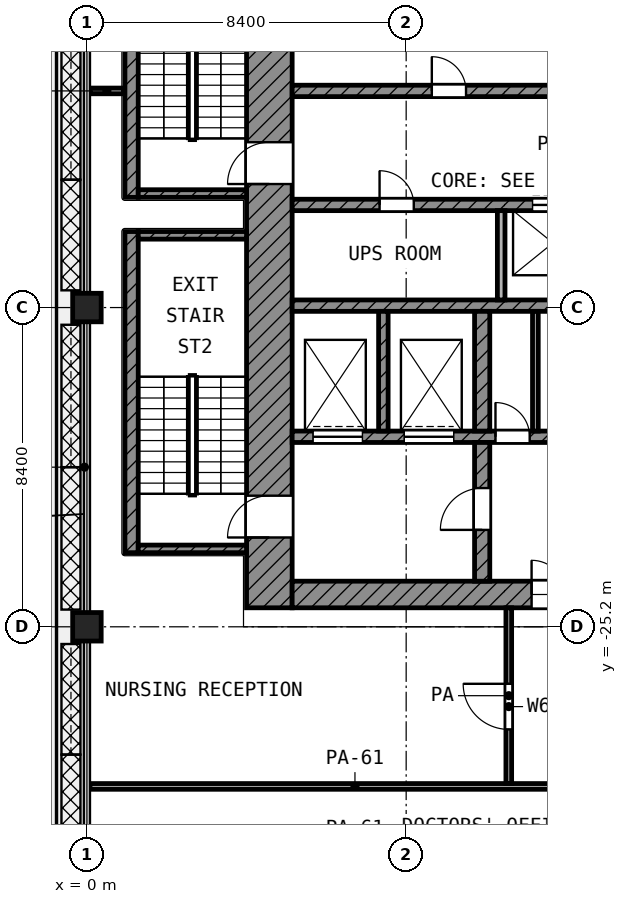
"""IFC4 building model, lengths in metres.
Left out: names, types, materials, properties, quantities, classifications, styles, units other than length and angle.
Written with IfcOpenShell. Run it as: python <this file> out.ifc"""

import sys

from ifc_helpers import new_model, si_unit, direction, frame, frame_2d, origin, origin_2d, place, context, subcontext, project, spatial, rectangle, extrude, element, fill, save


model = new_model("IFC4")
c1 = context("Model", 3, precision=1e-05, world=origin(), true_north=direction((0.0, 1.0)))
c2 = subcontext(c1, "Body", "Model", "MODEL_VIEW")
j1 = project(units=[si_unit("LENGTHUNIT", "METRE"), si_unit("PLANEANGLEUNIT", "RADIAN")], contexts=[c1])
p1 = place(None, origin())
s1 = spatial("IfcSite", under=j1, at=p1, CompositionType="ELEMENT")
p2 = place(p1, origin())
s2 = spatial("IfcBuilding", under=s1, at=p2, CompositionType="ELEMENT")
p3 = place(p2, frame((0.0, 0.0, 319.6)))
s3 = spatial("IfcBuildingStorey", under=s2, at=p3, CompositionType="ELEMENT", Elevation=319.6)
for number, where, z_axis, x_axis in (
    (1, (0.0, -16.8, 0.0), (0.0, 0.0, 1.0), (1.0, 0.0, 0.0)),
    (2, (0.0, -25.2, 0.0), (0.0, 0.0, 1.0), (1.0, 0.0, 0.0)),
):
    element("IfcColumn", number, at=place(p3, frame(where, z_axis=z_axis, x_axis=x_axis)), inside=s3, PredefinedType="COLUMN", context=c2, shape_type="SweptSolid", body=[
        extrude(rectangle(XDim=0.75, YDim=0.75, at=origin_2d()), origin(), (0.0, 0.0, 1.0), 4.2),
    ])
p4 = place(p3, frame((4.8, -24.7, 0.0), z_axis=(0.0, 0.0, 1.0), x_axis=(0.0, 1.0, 0.0)))
e3 = element("IfcWall", 3, at=p4, inside=s3, PredefinedType="SHEAR", context=c2, shape_type="SweptSolid", body=[
    extrude(rectangle(XDim=19.3, YDim=1.2, at=frame_2d((9.65, 0.0))), origin(), (0.0, 0.0, 1.0), 3.6),
])
p5 = place(p4, frame((11.15, 0.0, 0.0)))
e4 = element("IfcOpeningElement", 4, at=p5, cuts=e3, PredefinedType="OPENING", context=c2, shape_type="SweptSolid", body=[
    extrude(rectangle(XDim=1.1, YDim=2.1, at=frame_2d((0.55, 1.05))), frame((0.0, 0.61, 0.0), z_axis=(0.0, -1.0, 0.0), x_axis=(1.0, 0.0, 0.0)), (0.0, 0.0, 1.0), 1.22),
])
p6 = place(p4, frame((1.85, 0.0, 0.0)))
e5 = element("IfcOpeningElement", 5, at=p6, cuts=e3, PredefinedType="OPENING", context=c2, shape_type="SweptSolid", body=[
    extrude(rectangle(XDim=1.1, YDim=2.1, at=frame_2d((0.55, 1.05))), frame((0.0, 0.61, 0.0), z_axis=(0.0, -1.0, 0.0), x_axis=(1.0, 0.0, 0.0)), (0.0, 0.0, 1.0), 1.22),
])
p7 = place(p3, frame((5.4, -24.35, 0.0), z_axis=(0.0, 0.0, 1.0), x_axis=(1.0, 0.0, 0.0)))
e6 = element("IfcWall", 6, at=p7, inside=s3, PredefinedType="SHEAR", context=c2, shape_type="SweptSolid", body=[
    extrude(rectangle(XDim=18.6, YDim=0.7, at=frame_2d((9.3, 0.0))), origin(), (0.0, 0.0, 1.0), 3.6),
])
p8 = place(p7, frame((6.3, 0.0, 0.0)))
e7 = element("IfcOpeningElement", 7, at=p8, cuts=e6, PredefinedType="OPENING", context=c2, shape_type="SweptSolid", body=[
    extrude(rectangle(XDim=1.8, YDim=2.1, at=frame_2d((0.9, 1.05))), frame((0.0, 0.36, 0.0), z_axis=(0.0, -1.0, 0.0), x_axis=(1.0, 0.0, 0.0)), (0.0, 0.0, 1.0), 0.72),
])
p9 = place(p3, frame((5.4, -11.1, 0.0), z_axis=(0.0, 0.0, 1.0), x_axis=(1.0, 0.0, 0.0)))
e8 = element("IfcWall", 8, at=p9, inside=s3, PredefinedType="SHEAR", context=c2, shape_type="SweptSolid", body=[
    extrude(rectangle(XDim=16.65, YDim=0.3, at=frame_2d((8.325, 0.0))), origin(), (0.0, 0.0, 1.0), 3.6),
])
p10 = place(p9, frame((3.675, 0.0, 0.0)))
e9 = element("IfcOpeningElement", 9, at=p10, cuts=e8, PredefinedType="OPENING", context=c2, shape_type="SweptSolid", body=[
    extrude(rectangle(XDim=0.9, YDim=2.1, at=frame_2d((0.45, 1.05))), frame((0.0, 0.16, 0.0), z_axis=(0.0, -1.0, 0.0), x_axis=(1.0, 0.0, 0.0)), (0.0, 0.0, 1.0), 0.32),
])
p11 = place(p9, frame((11.925, 0.0, 0.0)))
e10 = element("IfcOpeningElement", 10, at=p11, cuts=e8, PredefinedType="OPENING", context=c2, shape_type="SweptSolid", body=[
    extrude(rectangle(XDim=0.9, YDim=2.1, at=frame_2d((0.45, 1.05))), frame((0.0, 0.16, 0.0), z_axis=(0.0, -1.0, 0.0), x_axis=(1.0, 0.0, 0.0)), (0.0, 0.0, 1.0), 0.32),
])
p12 = place(p3, frame((5.4, -14.1, 0.0), z_axis=(0.0, 0.0, 1.0), x_axis=(1.0, 0.0, 0.0)))
e11 = element("IfcWall", 11, at=p12, inside=s3, PredefinedType="SHEAR", context=c2, shape_type="SweptSolid", body=[
    extrude(rectangle(XDim=16.65, YDim=0.3, at=frame_2d((8.325, 0.0))), origin(), (0.0, 0.0, 1.0), 3.6),
])
p13 = place(p12, frame((6.325, 0.0, 0.0)))
e12 = element("IfcOpeningElement", 12, at=p13, cuts=e11, PredefinedType="OPENING", context=c2, shape_type="SweptSolid", body=[
    extrude(rectangle(XDim=1.1, YDim=2.1, at=frame_2d((0.55, 1.05))), frame((0.0, 0.16, 0.0), z_axis=(0.0, -1.0, 0.0), x_axis=(1.0, 0.0, 0.0)), (0.0, 0.0, 1.0), 0.32),
])
p14 = place(p12, frame((9.075, 0.0, 0.0)))
e13 = element("IfcOpeningElement", 13, at=p14, cuts=e11, PredefinedType="OPENING", context=c2, shape_type="SweptSolid", body=[
    extrude(rectangle(XDim=1.1, YDim=2.1, at=frame_2d((0.55, 1.05))), frame((0.0, 0.16, 0.0), z_axis=(0.0, -1.0, 0.0), x_axis=(1.0, 0.0, 0.0)), (0.0, 0.0, 1.0), 0.32),
])
p15 = place(p12, frame((11.825, 0.0, 0.0)))
e14 = element("IfcOpeningElement", 14, at=p15, cuts=e11, PredefinedType="OPENING", context=c2, shape_type="SweptSolid", body=[
    extrude(rectangle(XDim=1.1, YDim=2.1, at=frame_2d((0.55, 1.05))), frame((0.0, 0.16, 0.0), z_axis=(0.0, -1.0, 0.0), x_axis=(1.0, 0.0, 0.0)), (0.0, 0.0, 1.0), 0.32),
])
p16 = place(p12, frame((14.575, 0.0, 0.0)))
e15 = element("IfcOpeningElement", 15, at=p16, cuts=e11, PredefinedType="OPENING", context=c2, shape_type="SweptSolid", body=[
    extrude(rectangle(XDim=1.1, YDim=2.1, at=frame_2d((0.55, 1.05))), frame((0.0, 0.16, 0.0), z_axis=(0.0, -1.0, 0.0), x_axis=(1.0, 0.0, 0.0)), (0.0, 0.0, 1.0), 0.32),
])
p17 = place(p12, frame((2.3, 0.0, 0.0)))
e16 = element("IfcOpeningElement", 16, at=p17, cuts=e11, PredefinedType="OPENING", context=c2, shape_type="SweptSolid", body=[
    extrude(rectangle(XDim=0.9, YDim=2.1, at=frame_2d((0.45, 1.05))), frame((0.0, 0.16, 0.0), z_axis=(0.0, -1.0, 0.0), x_axis=(1.0, 0.0, 0.0)), (0.0, 0.0, 1.0), 0.32),
])
p18 = place(p3, frame((5.4, -16.75, 0.0), z_axis=(0.0, 0.0, 1.0), x_axis=(1.0, 0.0, 0.0)))
e17 = element("IfcWall", 17, at=p18, inside=s3, PredefinedType="SHEAR", context=c2, shape_type="SweptSolid", body=[
    extrude(rectangle(XDim=16.65, YDim=0.3, at=frame_2d((8.325, 0.0))), origin(), (0.0, 0.0, 1.0), 3.6),
])
p19 = place(p3, frame((5.4, -20.2, 0.0), z_axis=(0.0, 0.0, 1.0), x_axis=(1.0, 0.0, 0.0)))
e18 = element("IfcWall", 18, at=p19, inside=s3, PredefinedType="SHEAR", context=c2, shape_type="SweptSolid", body=[
    extrude(rectangle(XDim=14.65, YDim=0.3, at=frame_2d((7.325, 0.0))), origin(), (0.0, 0.0, 1.0), 3.6),
])
p20 = place(p19, frame((10.55, 0.0, 0.0)))
e19 = element("IfcOpeningElement", 19, at=p20, cuts=e18, PredefinedType="OPENING", context=c2, shape_type="SweptSolid", body=[
    extrude(rectangle(XDim=1.3, YDim=2.1, at=frame_2d((0.65, 1.05))), frame((0.0, 0.16, 0.0), z_axis=(0.0, -1.0, 0.0), x_axis=(1.0, 0.0, 0.0)), (0.0, 0.0, 1.0), 0.32),
])
p21 = place(p19, frame((12.95, 0.0, 0.0)))
e20 = element("IfcOpeningElement", 20, at=p21, cuts=e18, PredefinedType="OPENING", context=c2, shape_type="SweptSolid", body=[
    extrude(rectangle(XDim=1.3, YDim=2.1, at=frame_2d((0.65, 1.05))), frame((0.0, 0.16, 0.0), z_axis=(0.0, -1.0, 0.0), x_axis=(1.0, 0.0, 0.0)), (0.0, 0.0, 1.0), 0.32),
])
p22 = place(p19, frame((0.55, 0.0, 0.0)))
e21 = element("IfcOpeningElement", 21, at=p22, cuts=e18, PredefinedType="OPENING", context=c2, shape_type="SweptSolid", body=[
    extrude(rectangle(XDim=1.3, YDim=2.1, at=frame_2d((0.65, 1.05))), frame((0.0, 0.16, 0.0), z_axis=(0.0, -1.0, 0.0), x_axis=(1.0, 0.0, 0.0)), (0.0, 0.0, 1.0), 0.32),
])
p23 = place(p19, frame((2.95, 0.0, 0.0)))
e22 = element("IfcOpeningElement", 22, at=p23, cuts=e18, PredefinedType="OPENING", context=c2, shape_type="SweptSolid", body=[
    extrude(rectangle(XDim=1.3, YDim=2.1, at=frame_2d((0.65, 1.05))), frame((0.0, 0.16, 0.0), z_axis=(0.0, -1.0, 0.0), x_axis=(1.0, 0.0, 0.0)), (0.0, 0.0, 1.0), 0.32),
])
p24 = place(p19, frame((5.35, 0.0, 0.0)))
e23 = element("IfcOpeningElement", 23, at=p24, cuts=e18, PredefinedType="OPENING", context=c2, shape_type="SweptSolid", body=[
    extrude(rectangle(XDim=0.9, YDim=2.1, at=frame_2d((0.45, 1.05))), frame((0.0, 0.16, 0.0), z_axis=(0.0, -1.0, 0.0), x_axis=(1.0, 0.0, 0.0)), (0.0, 0.0, 1.0), 0.32),
])
p25 = place(p19, frame((7.75, 0.0, 0.0)))
e24 = element("IfcOpeningElement", 24, at=p25, cuts=e18, PredefinedType="OPENING", context=c2, shape_type="SweptSolid", body=[
    extrude(rectangle(XDim=0.9, YDim=2.1, at=frame_2d((0.45, 1.05))), frame((0.0, 0.16, 0.0), z_axis=(0.0, -1.0, 0.0), x_axis=(1.0, 0.0, 0.0)), (0.0, 0.0, 1.0), 0.32),
])
p26 = place(p3, frame((10.4, -24.0, 0.0), z_axis=(0.0, 0.0, 1.0), x_axis=(0.0, 1.0, 0.0)))
e25 = element("IfcWall", 25, at=p26, inside=s3, PredefinedType="SHEAR", context=c2, shape_type="SweptSolid", body=[
    extrude(rectangle(XDim=3.65, YDim=0.4, at=frame_2d((1.825, 0.0))), origin(), (0.0, 0.0, 1.0), 3.6),
])
p27 = place(p26, frame((1.35, 0.0, 0.0)))
e26 = element("IfcOpeningElement", 26, at=p27, cuts=e25, PredefinedType="OPENING", context=c2, shape_type="SweptSolid", body=[
    extrude(rectangle(XDim=1.1, YDim=2.1, at=frame_2d((0.55, 1.05))), frame((0.0, 0.21, 0.0), z_axis=(0.0, -1.0, 0.0), x_axis=(1.0, 0.0, 0.0)), (0.0, 0.0, 1.0), 0.42),
])
p28 = place(p3, frame((10.4, -20.05, 0.0), z_axis=(0.0, 0.0, 1.0), x_axis=(0.0, 1.0, 0.0)))
e27 = element("IfcWall", 27, at=p28, inside=s3, PredefinedType="SHEAR", context=c2, shape_type="SweptSolid", body=[
    extrude(rectangle(XDim=3.15, YDim=0.4, at=frame_2d((1.575, 0.0))), origin(), (0.0, 0.0, 1.0), 3.6),
])
p29 = place(p3, frame((7.8, -20.05, 0.0), z_axis=(0.0, 0.0, 1.0), x_axis=(0.0, 1.0, 0.0)))
e28 = element("IfcWall", 28, at=p29, inside=s3, PredefinedType="SHEAR", context=c2, shape_type="SweptSolid", body=[
    extrude(rectangle(XDim=3.15, YDim=0.25, at=frame_2d((1.575, 0.0))), origin(), (0.0, 0.0, 1.0), 3.6),
])
p30 = place(p3, frame((10.9, -16.6, 0.0), z_axis=(0.0, 0.0, 1.0), x_axis=(0.0, 1.0, 0.0)))
e29 = element("IfcWall", 29, at=p30, inside=s3, PredefinedType="PARTITIONING", context=c2, shape_type="SweptSolid", body=[
    extrude(rectangle(XDim=2.35, YDim=0.2, at=frame_2d((1.175, 0.0))), origin(), (0.0, 0.0, 1.0), 3.6),
])
p31 = place(p3, frame((11.8, -20.05, 0.0), z_axis=(0.0, 0.0, 1.0), x_axis=(0.0, 1.0, 0.0)))
e30 = element("IfcWall", 30, at=p31, inside=s3, PredefinedType="PARTITIONING", context=c2, shape_type="SweptSolid", body=[
    extrude(rectangle(XDim=3.15, YDim=0.15, at=frame_2d((1.575, 0.0))), origin(), (0.0, 0.0, 1.0), 3.6),
])
p32 = place(p3, frame((1.175, -13.9, 0.0), z_axis=(0.0, 0.0, 1.0), x_axis=(0.0, 1.0, 0.0)))
e31 = element("IfcWall", 31, at=p32, inside=s3, PredefinedType="SHEAR", context=c2, shape_type="SweptSolid", body=[
    extrude(rectangle(XDim=8.45, YDim=0.35, at=frame_2d((4.225, 0.0))), origin(), (0.0, 0.0, 1.0), 3.6),
])
p33 = place(p3, frame((1.35, -13.8, 0.0), z_axis=(0.0, 0.0, 1.0), x_axis=(1.0, 0.0, 0.0)))
e32 = element("IfcWall", 32, at=p33, inside=s3, PredefinedType="SHEAR", context=c2, shape_type="SweptSolid", body=[
    extrude(rectangle(XDim=2.85, YDim=0.2, at=frame_2d((1.425, 0.0))), origin(), (0.0, 0.0, 1.0), 3.6),
])
p34 = place(p3, frame((1.175, -23.25, 0.0), z_axis=(0.0, 0.0, 1.0), x_axis=(0.0, 1.0, 0.0)))
e33 = element("IfcWall", 33, at=p34, inside=s3, PredefinedType="SHEAR", context=c2, shape_type="SweptSolid", body=[
    extrude(rectangle(XDim=8.45, YDim=0.35, at=frame_2d((4.225, 0.0))), origin(), (0.0, 0.0, 1.0), 3.6),
])
for number, where, z_axis, x_axis in (
    (34, (1.35, -14.9, 0.0), (0.0, 0.0, 1.0), (1.0, 0.0, 0.0)),
    (35, (1.35, -23.15, 0.0), (0.0, 0.0, 1.0), (1.0, 0.0, 0.0)),
):
    element("IfcWall", number, at=place(p3, frame(where, z_axis=z_axis, x_axis=x_axis)), inside=s3, PredefinedType="SHEAR", context=c2, shape_type="SweptSolid", body=[
        extrude(rectangle(XDim=2.85, YDim=0.2, at=frame_2d((1.425, 0.0))), origin(), (0.0, 0.0, 1.0), 3.6),
    ])
p35 = place(p3, frame((0.08, -29.4, 0.0), z_axis=(0.0, 0.0, 1.0), x_axis=(1.0, 0.0, 0.0)))
e36 = element("IfcWall", 36, at=p35, inside=s3, PredefinedType="PARTITIONING", context=c2, shape_type="SweptSolid", body=[
    extrude(rectangle(XDim=13.945, YDim=0.15, at=frame_2d((6.972, 0.0))), origin(), (0.0, 0.0, 1.0), 2.7),
])
p36 = place(p3, frame((0.08, -11.1, 0.0), z_axis=(0.0, 0.0, 1.0), x_axis=(1.0, 0.0, 0.0)))
e37 = element("IfcWall", 37, at=p36, inside=s3, PredefinedType="PARTITIONING", context=c2, shape_type="SweptSolid", body=[
    extrude(rectangle(XDim=0.89, YDim=0.15, at=frame_2d((0.445, 0.0))), origin(), (0.0, 0.0, 1.0), 2.7),
])
p37 = place(p3, frame((11.1, -29.325, 0.0), z_axis=(0.0, 0.0, 1.0), x_axis=(0.0, 1.0, 0.0)))
e38 = element("IfcWall", 38, at=p37, inside=s3, PredefinedType="PARTITIONING", context=c2, shape_type="SweptSolid", body=[
    extrude(rectangle(XDim=4.625, YDim=0.15, at=frame_2d((2.312, 0.0))), origin(), (0.0, 0.0, 1.0), 3.6),
])
p38 = place(p37, frame((1.425, 0.0, 0.0)))
e39 = element("IfcOpeningElement", 39, at=p38, cuts=e38, PredefinedType="OPENING", context=c2, shape_type="SweptSolid", body=[
    extrude(rectangle(XDim=1.2, YDim=2.1, at=frame_2d((0.6, 1.05))), frame((0.0, 0.085, 0.0), z_axis=(0.0, -1.0, 0.0), x_axis=(1.0, 0.0, 0.0)), (0.0, 0.0, 1.0), 0.17),
])
p39 = place(p13, origin())
e40 = element("IfcDoor", 40, at=p39, inside=s3, OperationType="DOUBLE_DOOR_SLIDING", PredefinedType="DOOR", context=c2, shape_type="SweptSolid", body=[
    extrude(rectangle(XDim=1.1, YDim=2.1, at=frame_2d((0.55, 1.05))), frame((0.0, 0.025, 0.0), z_axis=(0.0, -1.0, 0.0), x_axis=(1.0, 0.0, 0.0)), (0.0, 0.0, 1.0), 0.05),
])
fill(e12, e40)
p40 = place(p22, origin())
e41 = element("IfcDoor", 41, at=p40, inside=s3, OperationType="DOUBLE_DOOR_SLIDING", PredefinedType="DOOR", context=c2, shape_type="SweptSolid", body=[
    extrude(rectangle(XDim=1.3, YDim=2.1, at=frame_2d((0.65, 1.05))), frame((0.0, 0.025, 0.0), z_axis=(0.0, -1.0, 0.0), x_axis=(1.0, 0.0, 0.0)), (0.0, 0.0, 1.0), 0.05),
])
fill(e21, e41)
p41 = place(p23, origin())
e42 = element("IfcDoor", 42, at=p41, inside=s3, OperationType="DOUBLE_DOOR_SLIDING", PredefinedType="DOOR", context=c2, shape_type="SweptSolid", body=[
    extrude(rectangle(XDim=1.3, YDim=2.1, at=frame_2d((0.65, 1.05))), frame((0.0, 0.025, 0.0), z_axis=(0.0, -1.0, 0.0), x_axis=(1.0, 0.0, 0.0)), (0.0, 0.0, 1.0), 0.05),
])
fill(e22, e42)
p42 = place(p5, origin())
e43 = element("IfcDoor", 43, at=p42, inside=s3, OperationType="SINGLE_SWING_LEFT", PredefinedType="DOOR", context=c2, shape_type="SweptSolid", body=[
    extrude(rectangle(XDim=1.1, YDim=2.1, at=frame_2d((0.55, 1.05))), frame((0.0, 0.025, 0.0), z_axis=(0.0, -1.0, 0.0), x_axis=(1.0, 0.0, 0.0)), (0.0, 0.0, 1.0), 0.05),
])
fill(e4, e43)
p43 = place(p6, origin())
e44 = element("IfcDoor", 44, at=p43, inside=s3, OperationType="SINGLE_SWING_LEFT", PredefinedType="DOOR", context=c2, shape_type="SweptSolid", body=[
    extrude(rectangle(XDim=1.1, YDim=2.1, at=frame_2d((0.55, 1.05))), frame((0.0, 0.025, 0.0), z_axis=(0.0, -1.0, 0.0), x_axis=(1.0, 0.0, 0.0)), (0.0, 0.0, 1.0), 0.05),
])
fill(e5, e44)
p44 = place(p27, origin())
e45 = element("IfcDoor", 45, at=p44, inside=s3, OperationType="SINGLE_SWING_LEFT", PredefinedType="DOOR", context=c2, shape_type="SweptSolid", body=[
    extrude(rectangle(XDim=1.1, YDim=2.1, at=frame_2d((0.55, 1.05))), frame((0.0, 0.025, 0.0), z_axis=(0.0, -1.0, 0.0), x_axis=(1.0, 0.0, 0.0)), (0.0, 0.0, 1.0), 0.05),
])
fill(e26, e45)
p45 = place(p8, origin())
e46 = element("IfcDoor", 46, at=p45, inside=s3, OperationType="DOUBLE_DOOR_SINGLE_SWING", PredefinedType="DOOR", context=c2, shape_type="SweptSolid", body=[
    extrude(rectangle(XDim=1.8, YDim=2.1, at=frame_2d((0.9, 1.05))), frame((0.0, 0.025, 0.0), z_axis=(0.0, -1.0, 0.0), x_axis=(1.0, 0.0, 0.0)), (0.0, 0.0, 1.0), 0.05),
])
fill(e7, e46)
p46 = place(p24, origin())
e47 = element("IfcDoor", 47, at=p46, inside=s3, OperationType="SINGLE_SWING_LEFT", PredefinedType="DOOR", context=c2, shape_type="SweptSolid", body=[
    extrude(rectangle(XDim=0.9, YDim=2.1, at=frame_2d((0.45, 1.05))), frame((0.0, 0.025, 0.0), z_axis=(0.0, -1.0, 0.0), x_axis=(1.0, 0.0, 0.0)), (0.0, 0.0, 1.0), 0.05),
])
fill(e23, e47)
p47 = place(p10, origin())
e48 = element("IfcDoor", 48, at=p47, inside=s3, OperationType="SINGLE_SWING_LEFT", PredefinedType="DOOR", context=c2, shape_type="SweptSolid", body=[
    extrude(rectangle(XDim=0.9, YDim=2.1, at=frame_2d((0.45, 1.05))), frame((0.0, 0.025, 0.0), z_axis=(0.0, -1.0, 0.0), x_axis=(1.0, 0.0, 0.0)), (0.0, 0.0, 1.0), 0.05),
])
fill(e9, e48)
p48 = place(p17, origin())
e49 = element("IfcDoor", 49, at=p48, inside=s3, OperationType="SINGLE_SWING_LEFT", PredefinedType="DOOR", context=c2, shape_type="SweptSolid", body=[
    extrude(rectangle(XDim=0.9, YDim=2.1, at=frame_2d((0.45, 1.05))), frame((0.0, 0.025, 0.0), z_axis=(0.0, -1.0, 0.0), x_axis=(1.0, 0.0, 0.0)), (0.0, 0.0, 1.0), 0.05),
])
fill(e16, e49)
p49 = place(p38, origin())
e50 = element("IfcDoor", 50, at=p49, inside=s3, OperationType="SINGLE_SWING_RIGHT", PredefinedType="DOOR", context=c2, shape_type="SweptSolid", body=[
    extrude(rectangle(XDim=1.2, YDim=2.1, at=frame_2d((0.6, 1.05))), frame((0.0, 0.025, 0.0), z_axis=(0.0, -1.0, 0.0), x_axis=(1.0, 0.0, 0.0)), (0.0, 0.0, 1.0), 0.05),
])
fill(e39, e50)
save(model, sys.argv[1])
